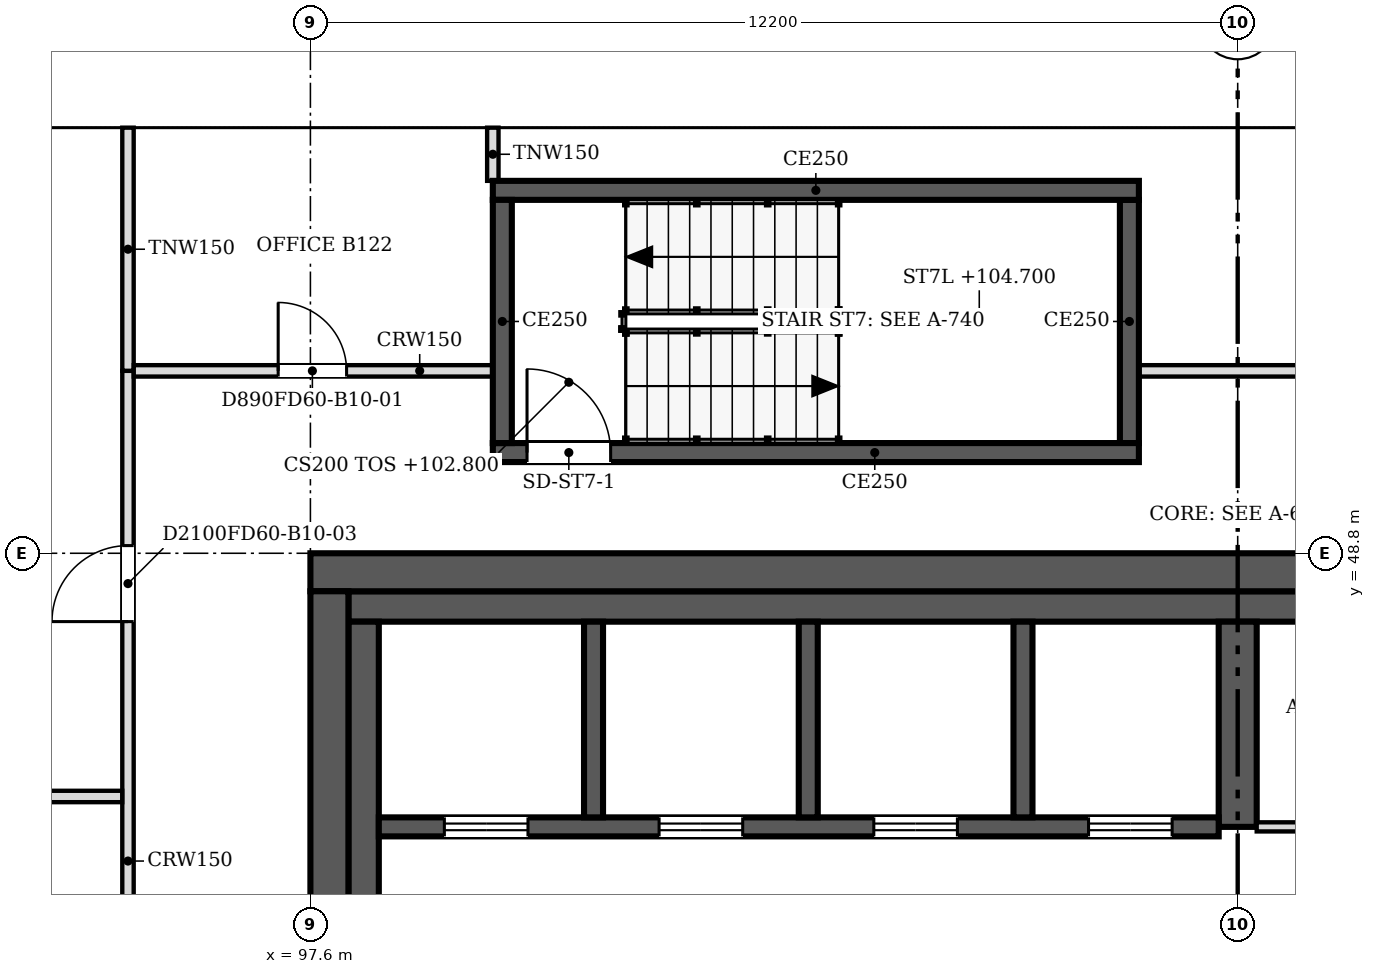
"""IFC4 building model, lengths in metres.
Left out: names, types, materials, properties, quantities, classifications, styles, units other than length and angle.
Written with IfcOpenShell. Run it as: python <this file> out.ifc"""

import sys

from ifc_helpers import new_model, si_unit, direction, frame, frame_2d, origin, place, context, subcontext, project, spatial, polyline, rectangle, outline, extrude, faceted_brep, source, transform, mapped, element, fill, save


model = new_model("IFC4")
c1 = context("Model", 3, precision=1e-05, world=origin(), true_north=direction((0.0, 1.0)))
c2 = subcontext(c1, "Body", "Model", "MODEL_VIEW")
j1 = project(units=[si_unit("LENGTHUNIT", "METRE"), si_unit("PLANEANGLEUNIT", "RADIAN")], contexts=[c1])
p1 = place(None, origin())
s1 = spatial("IfcSite", under=j1, at=p1, CompositionType="ELEMENT")
p2 = place(p1, origin())
s2 = spatial("IfcBuilding", under=s1, at=p2, CompositionType="ELEMENT")
p3 = place(p2, frame((0.0, 0.0, 102.8)))
s3 = spatial("IfcBuildingStorey", under=s2, at=p3, CompositionType="ELEMENT", Elevation=102.8)
m1 = source(origin(), c2, "Body", "SweptSolid", [
    extrude(outline(polyline([(3.05, 0.0), (6.1, 3.8), (3.05, 7.6), (0.0, 3.8), (3.05, 0.0)])), frame((0.0, 0.25, 0.0), z_axis=(0.0, -1.0, 0.0), x_axis=(1.0, 0.0, 0.0)), (0.0, 0.0, 1.0), 0.5),
])
p4 = place(p3, frame((112.85, 54.65, -3.8), z_axis=(0.0, 0.0, 1.0), x_axis=(-1.0, 0.0, 0.0)))
e1 = element("IfcWall", 1, at=p4, inside=s3, PredefinedType="SOLIDWALL", context=c2, shape_type="MappedRepresentation", body=[
    mapped(m1, transform((0.0, 0.0, 0.0), scale=1.0)),
])
m2 = source(origin(), c2, "Body", "SweptSolid", [
    extrude(outline(polyline([(3.05, 0.399), (5.78, 3.8), (3.05, 7.201), (0.321, 3.8), (3.05, 0.399)])), frame((0.0, 0.26, 0.0), z_axis=(0.0, -1.0, 0.0), x_axis=(1.0, 0.0, 0.0)), (0.0, 0.0, 1.0), 0.52),
])
p5 = place(p4, origin())
e2 = element("IfcOpeningElement", 2, at=p5, cuts=e1, PredefinedType="OPENING", context=c2, shape_type="MappedRepresentation", body=[
    mapped(m2, transform((0.0, 0.0, 0.0), scale=1.0)),
])
p6 = place(p3, frame((106.75, 54.65, -3.8), z_axis=(0.0, 0.0, 1.0), x_axis=(-1.0, 0.0, 0.0)))
e3 = element("IfcWall", 3, at=p6, inside=s3, PredefinedType="SOLIDWALL", context=c2, shape_type="MappedRepresentation", body=[
    mapped(m1, transform((0.0, 0.0, 0.0), scale=1.0)),
])
p7 = place(p6, origin())
e4 = element("IfcOpeningElement", 4, at=p7, cuts=e3, PredefinedType="OPENING", context=c2, shape_type="MappedRepresentation", body=[
    mapped(m2, transform((0.0, 0.0, 0.0), scale=1.0)),
])
m3 = source(origin(), c2, "Body", "Brep", [
    faceted_brep([(3.05, -0.25, 0.0), (6.1, -0.25, 3.8), (6.1, -0.25, 3.8), (3.05, -0.25, 7.6), (0.0, -0.25, 3.8), (0.0, 0.25, 3.8), (3.05, 0.25, 7.6), (6.1, 0.25, 3.8), (6.1, 0.25, 3.8), (3.05, 0.25, 0.0)], [[[0, 1, 2, 3, 4]], [[5, 6, 7, 8, 9]], [[9, 8, 1, 0]], [[7, 6, 3, 2]], [[6, 5, 4, 3]], [[5, 9, 0, 4]], [[1, 8, 7, 2]]]),
])
p8 = place(p3, frame((100.65, 54.65, -3.8), z_axis=(0.0, 0.0, 1.0), x_axis=(-1.0, 0.0, 0.0)))
e5 = element("IfcWall", 5, at=p8, inside=s3, PredefinedType="SOLIDWALL", context=c2, shape_type="MappedRepresentation", body=[
    mapped(m3, transform((0.0, 0.0, 0.0), scale=1.0)),
])
p9 = place(p8, origin())
e6 = element("IfcOpeningElement", 6, at=p9, cuts=e5, PredefinedType="OPENING", context=c2, shape_type="MappedRepresentation", body=[
    mapped(m2, transform((0.0, 0.0, 0.0), scale=1.0)),
])
m4 = source(origin(), c2, "Body", "Brep", [
    faceted_brep([(3.003, -0.25, 0.0), (3.05, -0.25, 0.06), (3.05, -0.25, 7.54), (3.003, -0.25, 7.6), (0.0, -0.25, 3.8), (0.0, 0.25, 3.8), (2.957, 0.25, 7.541), (2.957, 0.25, 0.059), (3.003, 0.0, 0.0), (3.003, 0.0, 7.6)], [[[0, 1, 2, 3, 4]], [[5, 6, 7]], [[1, 0, 8]], [[9, 3, 2]], [[6, 5, 4, 3, 9]], [[5, 7, 8, 0, 4]], [[1, 8, 7, 6, 9, 2]]]),
])
p10 = place(p3, frame((94.55, 54.65, -3.8), z_axis=(0.0, 0.0, 1.0), x_axis=(-1.0, 0.0, 0.0)))
e7 = element("IfcWall", 7, at=p10, inside=s3, PredefinedType="SOLIDWALL", context=c2, shape_type="MappedRepresentation", body=[
    mapped(m4, transform((0.0, 0.0, 0.0), scale=1.0)),
])
m5 = source(origin(), c2, "Body", "SweptSolid", [
    extrude(outline(polyline([(2.803, 6.944), (0.319, 3.8), (2.803, 0.656), (2.803, 6.944)])), frame((0.0, 0.26, 0.0), z_axis=(0.0, -1.0, 0.0), x_axis=(1.0, 0.0, 0.0)), (0.0, 0.0, 1.0), 0.52),
])
p11 = place(p10, origin())
e8 = element("IfcOpeningElement", 8, at=p11, cuts=e7, PredefinedType="OPENING", context=c2, shape_type="MappedRepresentation", body=[
    mapped(m5, transform((0.0, 0.0, 0.0), scale=1.0)),
])
m6 = source(origin(), c2, "Body", "Brep", [
    faceted_brep([(3.05, -0.25, 0.0), (6.1, -0.25, 3.8), (6.1, -0.25, 3.8), (0.0, -0.25, 3.8), (0.0, 0.25, 3.8), (6.1, 0.25, 3.8), (6.1, 0.25, 3.8), (3.05, 0.25, 0.0)], [[[0, 1, 2, 3]], [[4, 5, 6, 7]], [[7, 6, 1, 0]], [[5, 4, 3, 2]], [[4, 7, 0, 3]], [[1, 6, 5, 2]]]),
])
p12 = place(p3, frame((115.9, 54.65, 0.0), z_axis=(0.0, 0.0, 1.0), x_axis=(-1.0, 0.0, 0.0)))
e9 = element("IfcWall", 9, at=p12, inside=s3, PredefinedType="SOLIDWALL", context=c2, shape_type="MappedRepresentation", body=[
    mapped(m6, transform((0.0, 0.0, 0.0), scale=1.0)),
])
m7 = source(origin(), c2, "Body", "SweptSolid", [
    extrude(outline(polyline([(3.05, 0.399), (5.579, 3.55), (0.521, 3.55), (3.05, 0.399)])), frame((0.0, 0.26, 0.0), z_axis=(0.0, -1.0, 0.0), x_axis=(1.0, 0.0, 0.0)), (0.0, 0.0, 1.0), 0.52),
])
p13 = place(p12, origin())
e10 = element("IfcOpeningElement", 10, at=p13, cuts=e9, PredefinedType="OPENING", context=c2, shape_type="MappedRepresentation", body=[
    mapped(m7, transform((0.0, 0.0, 0.0), scale=1.0)),
])
m8 = source(origin(), c2, "Body", "SweptSolid", [
    extrude(outline(polyline([(3.05, 0.0), (6.1, 3.8), (0.0, 3.8), (3.05, 0.0)])), frame((0.0, 0.25, 0.0), z_axis=(0.0, -1.0, 0.0), x_axis=(1.0, 0.0, 0.0)), (0.0, 0.0, 1.0), 0.5),
])
p14 = place(p3, frame((109.8, 54.65, 0.0), z_axis=(0.0, 0.0, 1.0), x_axis=(-1.0, 0.0, 0.0)))
e11 = element("IfcWall", 11, at=p14, inside=s3, PredefinedType="SOLIDWALL", context=c2, shape_type="MappedRepresentation", body=[
    mapped(m8, transform((0.0, 0.0, 0.0), scale=1.0)),
])
p15 = place(p14, origin())
e12 = element("IfcOpeningElement", 12, at=p15, cuts=e11, PredefinedType="OPENING", context=c2, shape_type="MappedRepresentation", body=[
    mapped(m7, transform((0.0, 0.0, 0.0), scale=1.0)),
])
p16 = place(p3, frame((103.7, 54.65, 0.0), z_axis=(0.0, 0.0, 1.0), x_axis=(-1.0, 0.0, 0.0)))
e13 = element("IfcWall", 13, at=p16, inside=s3, PredefinedType="SOLIDWALL", context=c2, shape_type="MappedRepresentation", body=[
    mapped(m6, transform((0.0, 0.0, 0.0), scale=1.0)),
])
p17 = place(p16, origin())
e14 = element("IfcOpeningElement", 14, at=p17, cuts=e13, PredefinedType="OPENING", context=c2, shape_type="MappedRepresentation", body=[
    mapped(m7, transform((0.0, 0.0, 0.0), scale=1.0)),
])
m9 = source(origin(), c2, "Body", "Brep", [
    faceted_brep([(3.05, -0.25, 0.0), (6.053, -0.25, 3.8), (0.0, -0.25, 3.8), (0.0, 0.25, 3.8), (6.007, 0.25, 3.8), (6.007, 0.25, 3.741), (3.05, 0.25, 0.0), (6.053, 0.0, 3.8)], [[[0, 1, 2]], [[3, 4, 5, 6]], [[6, 5, 7, 1, 0]], [[4, 3, 2, 1, 7]], [[3, 6, 0, 2]], [[5, 4, 7]]]),
])
p18 = place(p3, frame((97.6, 54.65, 0.0), z_axis=(0.0, 0.0, 1.0), x_axis=(-1.0, 0.0, 0.0)))
e15 = element("IfcWall", 15, at=p18, inside=s3, PredefinedType="SOLIDWALL", context=c2, shape_type="MappedRepresentation", body=[
    mapped(m9, transform((0.0, 0.0, 0.0), scale=1.0)),
])
m10 = source(origin(), c2, "Body", "SweptSolid", [
    extrude(outline(polyline([(3.049, 0.401), (5.537, 3.55), (0.521, 3.55), (3.049, 0.401)])), frame((0.0, 0.26, 0.0), z_axis=(0.0, -1.0, 0.0), x_axis=(1.0, 0.0, 0.0)), (0.0, 0.0, 1.0), 0.52),
])
p19 = place(p18, origin())
e16 = element("IfcOpeningElement", 16, at=p19, cuts=e15, PredefinedType="OPENING", context=c2, shape_type="MappedRepresentation", body=[
    mapped(m10, transform((0.0, 0.0, 0.0), scale=1.0)),
])
p20 = place(p3, frame((97.85, 37.1, 0.0), z_axis=(0.0, 0.0, 1.0), x_axis=(0.0, 1.0, 0.0)))
e17 = element("IfcWall", 17, at=p20, inside=s3, PredefinedType="SHEAR", context=c2, shape_type="SweptSolid", body=[
    extrude(rectangle(XDim=11.2, YDim=0.5, at=frame_2d((5.6, 0.0))), origin(), (0.0, 0.0, 1.0), 3.8),
])
m11 = source(origin(), c2, "Body", "SweptSolid", [
    extrude(rectangle(XDim=2.1, YDim=2.4, at=frame_2d((1.05, 1.2))), frame((0.0, 0.26, 0.0), z_axis=(0.0, -1.0, 0.0), x_axis=(1.0, 0.0, 0.0)), (0.0, 0.0, 1.0), 0.52),
])
p21 = place(p20, frame((4.7, 0.0, 0.0)))
e18 = element("IfcOpeningElement", 18, at=p21, cuts=e17, PredefinedType="OPENING", context=c2, shape_type="MappedRepresentation", body=[
    mapped(m11, transform((0.0, 0.0, 0.0), scale=1.0)),
])
p22 = place(p3, frame((97.6, 48.55, 0.0), z_axis=(0.0, 0.0, 1.0), x_axis=(1.0, 0.0, 0.0)))
e19 = element("IfcWall", 19, at=p22, inside=s3, PredefinedType="SHEAR", context=c2, shape_type="SweptSolid", body=[
    extrude(rectangle(XDim=24.4, YDim=0.5, at=frame_2d((12.2, 0.0))), origin(), (0.0, 0.0, 1.0), 3.8),
])
p23 = place(p3, frame((98.1, 48.1, 0.0), z_axis=(0.0, 0.0, 1.0), x_axis=(1.0, 0.0, 0.0)))
e20 = element("IfcWall", 20, at=p23, inside=s3, PredefinedType="SOLIDWALL", context=c2, shape_type="SweptSolid", body=[
    extrude(rectangle(XDim=23.4, YDim=0.4, at=frame_2d((11.7, 0.0))), origin(), (0.0, 0.0, 1.0), 3.8),
])
p24 = place(p3, frame((98.3, 43.9, 0.0), z_axis=(0.0, 0.0, 1.0), x_axis=(0.0, 1.0, 0.0)))
e21 = element("IfcWall", 21, at=p24, inside=s3, PredefinedType="SOLIDWALL", context=c2, shape_type="SweptSolid", body=[
    extrude(rectangle(XDim=4.0, YDim=0.4, at=frame_2d((2.0, 0.0))), origin(), (0.0, 0.0, 1.0), 3.8),
])
p25 = place(p3, frame((109.8, 45.2, 0.0), z_axis=(0.0, 0.0, 1.0), x_axis=(0.0, 1.0, 0.0)))
e22 = element("IfcWall", 22, at=p25, inside=s3, PredefinedType="SHEAR", context=c2, shape_type="SweptSolid", body=[
    extrude(rectangle(XDim=2.7, YDim=0.5, at=frame_2d((1.35, 0.0))), origin(), (0.0, 0.0, 1.0), 3.8),
])
p26 = place(p3, frame((109.55, 45.2, 0.0), z_axis=(0.0, 0.0, 1.0), x_axis=(-1.0, 0.0, 0.0)))
e23 = element("IfcWall", 23, at=p26, inside=s3, PredefinedType="SOLIDWALL", context=c2, shape_type="SweptSolid", body=[
    extrude(rectangle(XDim=11.05, YDim=0.25, at=frame_2d((5.525, 0.0))), origin(), (0.0, 0.0, 1.0), 3.8),
])
m12 = source(origin(), c2, "Body", "SweptSolid", [
    extrude(rectangle(XDim=1.1, YDim=2.1, at=frame_2d((0.55, 1.05))), frame((0.0, 0.135, 0.0), z_axis=(0.0, -1.0, 0.0), x_axis=(1.0, 0.0, 0.0)), (0.0, 0.0, 1.0), 0.27),
])
p27 = place(p26, frame((9.087, 0.0, 0.0)))
e24 = element("IfcOpeningElement", 24, at=p27, cuts=e23, PredefinedType="OPENING", context=c2, shape_type="MappedRepresentation", body=[
    mapped(m12, transform((0.0, 0.0, 0.0), scale=1.0)),
])
p28 = place(p26, frame((6.262, 0.0, 0.0)))
e25 = element("IfcOpeningElement", 25, at=p28, cuts=e23, PredefinedType="OPENING", context=c2, shape_type="MappedRepresentation", body=[
    mapped(m12, transform((0.0, 0.0, 0.0), scale=1.0)),
])
p29 = place(p26, frame((3.438, 0.0, 0.0)))
e26 = element("IfcOpeningElement", 26, at=p29, cuts=e23, PredefinedType="OPENING", context=c2, shape_type="MappedRepresentation", body=[
    mapped(m12, transform((0.0, 0.0, 0.0), scale=1.0)),
])
p30 = place(p26, frame((0.613, 0.0, 0.0)))
e27 = element("IfcOpeningElement", 27, at=p30, cuts=e23, PredefinedType="OPENING", context=c2, shape_type="MappedRepresentation", body=[
    mapped(m12, transform((0.0, 0.0, 0.0), scale=1.0)),
])
for number, where, z_axis, x_axis in (
    (28, (101.325, 45.325, 0.0), (0.0, 0.0, 1.0), (0.0, 1.0, 0.0)),
    (29, (104.15, 45.325, 0.0), (0.0, 0.0, 1.0), (0.0, 1.0, 0.0)),
    (30, (106.975, 45.325, 0.0), (0.0, 0.0, 1.0), (0.0, 1.0, 0.0)),
):
    element("IfcWall", number, at=place(p3, frame(where, z_axis=z_axis, x_axis=x_axis)), inside=s3, PredefinedType="SOLIDWALL", context=c2, shape_type="SweptSolid", body=[
        extrude(rectangle(XDim=2.575, YDim=0.25, at=frame_2d((1.288, 0.0))), origin(), (0.0, 0.0, 1.0), 3.8),
    ])
p31 = place(p3, frame((110.05, 45.2, 0.0), z_axis=(0.0, 0.0, 1.0), x_axis=(1.0, 0.0, 0.0)))
e31 = element("IfcWall", 31, at=p31, inside=s3, PredefinedType="PARTITIONING", context=c2, shape_type="SweptSolid", body=[
    extrude(rectangle(XDim=11.05, YDim=0.12, at=frame_2d((5.525, 0.0))), origin(), (0.0, 0.0, 1.0), 3.55),
])
m13 = source(origin(), c2, "Body", "SweptSolid", [
    extrude(rectangle(XDim=0.9, YDim=2.1, at=frame_2d((0.45, 1.05))), frame((0.0, 0.07, 0.0), z_axis=(0.0, -1.0, 0.0), x_axis=(1.0, 0.0, 0.0)), (0.0, 0.0, 1.0), 0.14),
])
p32 = place(p31, frame((0.712, 0.0, 0.0)))
e32 = element("IfcOpeningElement", 32, at=p32, cuts=e31, PredefinedType="OPENING", context=c2, shape_type="MappedRepresentation", body=[
    mapped(m13, transform((0.0, 0.0, 0.0), scale=1.0)),
])
p33 = place(p31, frame((6.363, 0.0, 0.0)))
e33 = element("IfcOpeningElement", 33, at=p33, cuts=e31, PredefinedType="OPENING", context=c2, shape_type="MappedRepresentation", body=[
    mapped(m13, transform((0.0, 0.0, 0.0), scale=1.0)),
])
p34 = place(p3, frame((108.5, 50.125, 0.0), z_axis=(0.0, 0.0, 1.0), x_axis=(-1.0, 0.0, 0.0)))
e34 = element("IfcWall", 34, at=p34, inside=s3, PredefinedType="SOLIDWALL", context=c2, shape_type="SweptSolid", body=[
    extrude(rectangle(XDim=8.5, YDim=0.25, at=frame_2d((4.25, 0.0))), origin(), (0.0, 0.0, 1.0), 3.8),
])
p35 = place(p34, frame((6.95, 0.0, 0.0)))
e35 = element("IfcOpeningElement", 35, at=p35, cuts=e34, PredefinedType="OPENING", context=c2, shape_type="MappedRepresentation", body=[
    mapped(m12, transform((0.0, 0.0, 0.0), scale=1.0)),
])
p36 = place(p3, frame((100.125, 50.25, 0.0), z_axis=(0.0, 0.0, 1.0), x_axis=(0.0, 1.0, 0.0)))
e36 = element("IfcWall", 36, at=p36, inside=s3, PredefinedType="SOLIDWALL", context=c2, shape_type="SweptSolid", body=[
    extrude(rectangle(XDim=3.2, YDim=0.25, at=frame_2d((1.6, 0.0))), origin(), (0.0, 0.0, 1.0), 3.8),
])
p37 = place(p3, frame((100.0, 53.575, 0.0), z_axis=(0.0, 0.0, 1.0), x_axis=(1.0, 0.0, 0.0)))
e37 = element("IfcWall", 37, at=p37, inside=s3, PredefinedType="SOLIDWALL", context=c2, shape_type="SweptSolid", body=[
    extrude(rectangle(XDim=8.5, YDim=0.25, at=frame_2d((4.25, 0.0))), origin(), (0.0, 0.0, 1.0), 3.8),
])
p38 = place(p3, frame((108.375, 53.45, 0.0), z_axis=(0.0, 0.0, 1.0), x_axis=(0.0, -1.0, 0.0)))
e38 = element("IfcWall", 38, at=p38, inside=s3, PredefinedType="SOLIDWALL", context=c2, shape_type="SweptSolid", body=[
    extrude(rectangle(XDim=3.2, YDim=0.25, at=frame_2d((1.6, 0.0))), origin(), (0.0, 0.0, 1.0), 3.8),
])
p39 = place(p3, frame((95.2, 36.6, 0.0), z_axis=(0.0, 0.0, 1.0), x_axis=(0.0, 1.0, 0.0)))
e39 = element("IfcWall", 39, at=p39, inside=s3, PredefinedType="PARTITIONING", context=c2, shape_type="SweptSolid", body=[
    extrude(rectangle(XDim=14.6, YDim=0.15, at=frame_2d((7.3, 0.0))), origin(), (0.0, 0.0, 1.0), 2.715),
])
m14 = source(origin(), c2, "Body", "SweptSolid", [
    extrude(rectangle(XDim=1.0, YDim=2.1, at=frame_2d((0.5, 1.05))), frame((0.0, 0.085, 0.0), z_axis=(0.0, -1.0, 0.0), x_axis=(1.0, 0.0, 0.0)), (0.0, 0.0, 1.0), 0.17),
])
p40 = place(p39, frame((11.301, 0.0, 0.0)))
e40 = element("IfcOpeningElement", 40, at=p40, cuts=e39, PredefinedType="OPENING", context=c2, shape_type="MappedRepresentation", body=[
    mapped(m14, transform((0.0, 0.0, 0.0), scale=1.0)),
])
p41 = place(p39, frame((4.0, 0.0, 0.0)))
e41 = element("IfcOpeningElement", 41, at=p41, cuts=e39, PredefinedType="OPENING", context=c2, shape_type="MappedRepresentation", body=[
    mapped(m14, transform((0.0, 0.0, 0.0), scale=1.0)),
])
p42 = place(p3, frame((85.9, 45.6, 0.0), z_axis=(0.0, 0.0, 1.0), x_axis=(1.0, 0.0, 0.0)))
e42 = element("IfcWall", 42, at=p42, inside=s3, PredefinedType="PARTITIONING", context=c2, shape_type="SweptSolid", body=[
    extrude(rectangle(XDim=9.224, YDim=0.15, at=frame_2d((4.612, 0.0))), origin(), (0.0, 0.0, 1.0), 2.715),
])
p43 = place(p3, frame((95.2, 51.201, 0.0), z_axis=(0.0, 0.0, 1.0), x_axis=(0.0, 1.0, 0.0)))
e43 = element("IfcWall", 43, at=p43, inside=s3, PredefinedType="PARTITIONING", context=c2, shape_type="SweptSolid", body=[
    extrude(rectangle(XDim=3.199, YDim=0.15, at=frame_2d((1.6, 0.0))), origin(), (0.0, 0.0, 1.0), 2.715),
])
p44 = place(p3, frame((95.276, 51.2, 0.0), z_axis=(0.0, 0.0, 1.0), x_axis=(1.0, 0.0, 0.0)))
e44 = element("IfcWall", 44, at=p44, inside=s3, PredefinedType="PARTITIONING", context=c2, shape_type="SweptSolid", body=[
    extrude(rectangle(XDim=4.724, YDim=0.15, at=frame_2d((2.362, 0.0))), origin(), (0.0, 0.0, 1.0), 2.715),
])
m15 = source(origin(), c2, "Body", "SweptSolid", [
    extrude(rectangle(XDim=0.9, YDim=2.1, at=frame_2d((0.45, 1.05))), frame((0.0, 0.085, 0.0), z_axis=(0.0, -1.0, 0.0), x_axis=(1.0, 0.0, 0.0)), (0.0, 0.0, 1.0), 0.17),
])
p45 = place(p44, frame((1.9, 0.0, 0.0)))
e45 = element("IfcOpeningElement", 45, at=p45, cuts=e44, PredefinedType="OPENING", context=c2, shape_type="MappedRepresentation", body=[
    mapped(m15, transform((0.0, 0.0, 0.0), scale=1.0)),
])
p46 = place(p3, frame((108.5, 51.2, 0.0), z_axis=(0.0, 0.0, 1.0), x_axis=(1.0, 0.0, 0.0)))
e46 = element("IfcWall", 46, at=p46, inside=s3, PredefinedType="PARTITIONING", context=c2, shape_type="SweptSolid", body=[
    extrude(rectangle(XDim=13.5, YDim=0.15, at=frame_2d((6.75, 0.0))), origin(), (0.0, 0.0, 1.0), 2.715),
])
p47 = place(p3, frame((100.0, 53.7, 0.0), z_axis=(0.0, 0.0, 1.0), x_axis=(0.0, 1.0, 0.0)))
e47 = element("IfcWall", 47, at=p47, inside=s3, PredefinedType="PARTITIONING", context=c2, shape_type="SweptSolid", body=[
    extrude(rectangle(XDim=0.7, YDim=0.15, at=frame_2d((0.35, 0.0))), origin(), (0.0, 0.0, 1.0), 2.715),
])
m16 = source(origin(), c2, "Body", "SweptSolid", [
    extrude(rectangle(XDim=1.1, YDim=2.1, at=frame_2d((0.55, 1.05))), frame((0.0, 0.025, 0.0), z_axis=(0.0, -1.0, 0.0), x_axis=(1.0, 0.0, 0.0)), (0.0, 0.0, 1.0), 0.05),
])
p48 = place(p27, origin())
e48 = element("IfcDoor", 48, at=p48, inside=s3, OperationType="DOUBLE_DOOR_SLIDING", PredefinedType="DOOR", context=c2, shape_type="MappedRepresentation", body=[
    mapped(m16, transform((0.0, 0.0, 0.0), scale=1.0)),
])
fill(e24, e48)
p49 = place(p28, origin())
e49 = element("IfcDoor", 49, at=p49, inside=s3, OperationType="DOUBLE_DOOR_SLIDING", PredefinedType="DOOR", context=c2, shape_type="MappedRepresentation", body=[
    mapped(m16, transform((0.0, 0.0, 0.0), scale=1.0)),
])
fill(e25, e49)
p50 = place(p29, origin())
e50 = element("IfcDoor", 50, at=p50, inside=s3, OperationType="DOUBLE_DOOR_SLIDING", PredefinedType="DOOR", context=c2, shape_type="MappedRepresentation", body=[
    mapped(m16, transform((0.0, 0.0, 0.0), scale=1.0)),
])
fill(e26, e50)
p51 = place(p30, origin())
e51 = element("IfcDoor", 51, at=p51, inside=s3, OperationType="DOUBLE_DOOR_SLIDING", PredefinedType="DOOR", context=c2, shape_type="MappedRepresentation", body=[
    mapped(m16, transform((0.0, 0.0, 0.0), scale=1.0)),
])
fill(e27, e51)
p52 = place(p35, origin())
e52 = element("IfcDoor", 52, at=p52, inside=s3, OperationType="SINGLE_SWING_RIGHT", PredefinedType="DOOR", context=c2, shape_type="MappedRepresentation", body=[
    mapped(m16, transform((0.0, 0.0, 0.0), scale=1.0)),
])
fill(e35, e52)
m17 = source(origin(), c2, "Body", "SweptSolid", [
    extrude(rectangle(XDim=0.9, YDim=2.1, at=frame_2d((0.45, 1.05))), frame((0.0, 0.025, 0.0), z_axis=(0.0, -1.0, 0.0), x_axis=(1.0, 0.0, 0.0)), (0.0, 0.0, 1.0), 0.05),
])
p53 = place(p45, origin())
e53 = element("IfcDoor", 53, at=p53, inside=s3, OperationType="SINGLE_SWING_LEFT", PredefinedType="DOOR", context=c2, shape_type="MappedRepresentation", body=[
    mapped(m17, transform((0.0, 0.0, 0.0), scale=1.0)),
])
fill(e45, e53)
m18 = source(origin(), c2, "Body", "SweptSolid", [
    extrude(rectangle(XDim=1.0, YDim=2.1, at=frame_2d((0.5, 1.05))), frame((0.0, 0.025, 0.0), z_axis=(0.0, -1.0, 0.0), x_axis=(1.0, 0.0, 0.0)), (0.0, 0.0, 1.0), 0.05),
])
p54 = place(p40, origin())
e54 = element("IfcDoor", 54, at=p54, inside=s3, OperationType="SINGLE_SWING_LEFT", PredefinedType="DOOR", context=c2, shape_type="MappedRepresentation", body=[
    mapped(m18, transform((0.0, 0.0, 0.0), scale=1.0)),
])
fill(e40, e54)
save(model, sys.argv[1])
